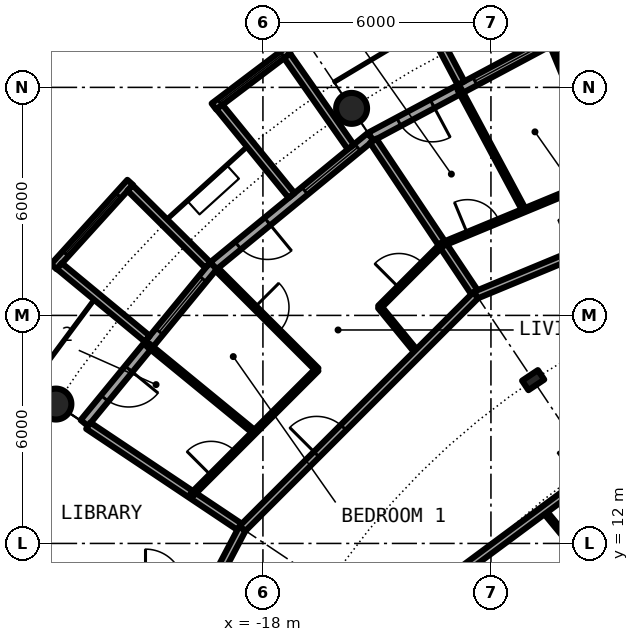
"""IFC4 building model, lengths in metres.
Left out: names, types, materials, properties, quantities, classifications, styles, units other than length and angle.
Written with IfcOpenShell. Run it as: python <this file> out.ifc"""

import sys

from ifc_helpers import new_model, si_unit, direction, frame, frame_2d, origin, origin_2d, place, context, subcontext, project, spatial, rectangle, circle, hollow_circle, i_section, extrude, element, fill, save


model = new_model("IFC4")
c1 = context("Model", 3, precision=1e-05, world=origin(), true_north=direction((0.0, 1.0)))
c2 = subcontext(c1, "Body", "Model", "MODEL_VIEW")
j1 = project(units=[si_unit("LENGTHUNIT", "METRE"), si_unit("PLANEANGLEUNIT", "RADIAN")], contexts=[c1])
p1 = place(None, origin())
s1 = spatial("IfcSite", under=j1, at=p1, CompositionType="ELEMENT")
p2 = place(p1, origin())
s2 = spatial("IfcBuilding", under=s1, at=p2, CompositionType="ELEMENT")
p3 = place(p2, frame((0.0, 0.0, 167.7)))
s3 = spatial("IfcBuildingStorey", under=s2, at=p3, CompositionType="ELEMENT", Elevation=167.7)
for number, where, z_axis, x_axis in (
    (1, (-15.667, 23.448, 0.0), (0.0, 0.0, 1.0), (1.0, 0.0, 0.0)),
    (2, (-23.448, 15.667, 0.0), (0.0, 0.0, 1.0), (1.0, 0.0, 0.0)),
):
    element("IfcColumn", number, at=place(p3, frame(where, z_axis=z_axis, x_axis=x_axis)), inside=s3, PredefinedType="COLUMN", context=c2, shape_type="SweptSolid", body=[
        extrude(hollow_circle(Radius=0.406, WallThickness=0.04, at=origin_2d()), origin(), (0.0, 0.0, 1.0), 3.05),
    ])
p4 = place(p3, frame((-10.889, 16.297, 0.0), z_axis=(0.0, 0.0, 1.0), x_axis=(-0.55557023302, 0.831469612303, 0.0)))
e3 = element("IfcColumn", 3, at=p4, inside=s3, PredefinedType="COLUMN", context=c2, shape_type="SweptSolid", body=[
    extrude(i_section(OverallWidth=0.3, OverallDepth=0.5, WebThickness=0.014, FlangeThickness=0.028, FilletRadius=0.027, at=origin_2d()), origin(), (0.0, 0.0, 1.0), 3.05),
])
p5 = place(p3, frame((-10.447, 25.222, 0.0), z_axis=(0.0, 0.0, 1.0), x_axis=(-0.881915646801, -0.471407246368, 0.0)))
e4 = element("IfcWall", 4, at=p5, inside=s3, PredefinedType="SOLIDWALL", context=c2, shape_type="SweptSolid", body=[
    extrude(rectangle(XDim=5.352, YDim=0.25, at=frame_2d((2.676, 0.0))), origin(), (0.0, 0.0, 1.0), 2.7),
])
p6 = place(p5, frame((0.441, 0.0, 0.3)))
e5 = element("IfcOpeningElement", 5, at=p6, cuts=e4, PredefinedType="OPENING", context=c2, shape_type="SweptSolid", body=[
    extrude(rectangle(XDim=1.8, YDim=2.1, at=frame_2d((0.9, 1.05))), frame((0.0, 0.135, 0.0), z_axis=(0.0, -1.0, 0.0), x_axis=(1.0, 0.0, 0.0)), (0.0, 0.0, 1.0), 0.27),
])
p7 = place(p5, frame((3.51, 0.0, 0.0)))
e6 = element("IfcOpeningElement", 6, at=p7, cuts=e4, PredefinedType="OPENING", context=c2, shape_type="SweptSolid", body=[
    extrude(rectangle(XDim=1.0, YDim=2.2, at=frame_2d((0.5, 1.1))), frame((0.0, 0.135, 0.0), z_axis=(0.0, -1.0, 0.0), x_axis=(1.0, 0.0, 0.0)), (0.0, 0.0, 1.0), 0.27),
])
p8 = place(p3, frame((-12.787, 24.113, -0.03), z_axis=(0.0, 0.0, 1.0), x_axis=(-0.468365282436, 0.883534924159, 0.0)))
e7 = element("IfcWall", 7, at=p8, inside=s3, PredefinedType="SOLIDWALL", context=c2, shape_type="SweptSolid", body=[
    extrude(rectangle(XDim=3.006, YDim=0.2, at=frame_2d((1.503, 0.0))), origin(), (0.0, 0.0, 1.0), 2.73),
])
p9 = place(p3, frame((-15.167, 22.699, 0.0), z_axis=(0.0, 0.0, 1.0), x_axis=(-0.773019449054, -0.634382322723, 0.0)))
e8 = element("IfcWall", 8, at=p9, inside=s3, PredefinedType="SOLIDWALL", context=c2, shape_type="SweptSolid", body=[
    extrude(rectangle(XDim=5.352, YDim=0.25, at=frame_2d((2.676, 0.0))), origin(), (0.0, 0.0, 1.0), 2.7),
])
p10 = place(p9, frame((0.441, 0.0, 0.3)))
e9 = element("IfcOpeningElement", 9, at=p10, cuts=e8, PredefinedType="OPENING", context=c2, shape_type="SweptSolid", body=[
    extrude(rectangle(XDim=1.8, YDim=2.1, at=frame_2d((0.9, 1.05))), frame((0.0, 0.135, 0.0), z_axis=(0.0, -1.0, 0.0), x_axis=(1.0, 0.0, 0.0)), (0.0, 0.0, 1.0), 0.27),
])
p11 = place(p9, frame((3.51, 0.0, 0.0)))
e10 = element("IfcOpeningElement", 10, at=p11, cuts=e8, PredefinedType="OPENING", context=c2, shape_type="SweptSolid", body=[
    extrude(rectangle(XDim=1.0, YDim=2.2, at=frame_2d((0.5, 1.1))), frame((0.0, 0.135, 0.0), z_axis=(0.0, -1.0, 0.0), x_axis=(1.0, 0.0, 0.0)), (0.0, 0.0, 1.0), 0.27),
])
p12 = place(p3, frame((-17.337, 24.972, -0.03), z_axis=(0.0, 0.0, 1.0), x_axis=(-0.797887588059, -0.602806268067, 0.0)))
e11 = element("IfcWall", 11, at=p12, inside=s3, PredefinedType="SOLIDWALL", context=c2, shape_type="SweptSolid", body=[
    extrude(rectangle(XDim=2.447, YDim=0.2, at=frame_2d((1.223, 0.0))), origin(), (0.0, 0.0, 1.0), 2.73),
])
p13 = place(p12, frame((0.183, 0.0, 0.33)))
e12 = element("IfcOpeningElement", 12, at=p13, cuts=e11, PredefinedType="OPENING", context=c2, shape_type="SweptSolid", body=[
    extrude(circle(Radius=1.04, at=frame_2d((1.04, 1.04))), frame((0.0, 0.11, 0.0), z_axis=(0.0, -1.0, 0.0), x_axis=(1.0, 0.0, 0.0)), (0.0, 0.0, 1.0), 0.22),
])
p14 = place(p3, frame((-15.688, 22.433, -0.03), z_axis=(0.0, 0.0, 1.0), x_axis=(-0.573260687834, 0.819373043115, 0.0)))
e13 = element("IfcWall", 13, at=p14, inside=s3, PredefinedType="SOLIDWALL", context=c2, shape_type="SweptSolid", body=[
    extrude(rectangle(XDim=2.925, YDim=0.2, at=frame_2d((1.463, 0.0))), origin(), (0.0, 0.0, 1.0), 2.73),
])
p15 = place(p3, frame((-17.246, 21.155, -0.03), z_axis=(0.0, 0.0, 1.0), x_axis=(-0.631741648902, 0.775179004516, 0.0)))
e14 = element("IfcWall", 14, at=p15, inside=s3, PredefinedType="SOLIDWALL", context=c2, shape_type="SweptSolid", body=[
    extrude(rectangle(XDim=3.006, YDim=0.2, at=frame_2d((1.503, 0.0))), origin(), (0.0, 0.0, 1.0), 2.73),
])
p16 = place(p3, frame((-19.304, 19.304, 0.0), z_axis=(0.0, 0.0, 1.0), x_axis=(-0.634382322723, -0.773019449054, 0.0)))
e15 = element("IfcWall", 15, at=p16, inside=s3, PredefinedType="SOLIDWALL", context=c2, shape_type="SweptSolid", body=[
    extrude(rectangle(XDim=5.352, YDim=0.25, at=frame_2d((2.676, 0.0))), origin(), (0.0, 0.0, 1.0), 2.7),
])
p17 = place(p16, frame((0.441, 0.0, 0.3)))
e16 = element("IfcOpeningElement", 16, at=p17, cuts=e15, PredefinedType="OPENING", context=c2, shape_type="SweptSolid", body=[
    extrude(rectangle(XDim=1.8, YDim=2.1, at=frame_2d((0.9, 1.05))), frame((0.0, 0.135, 0.0), z_axis=(0.0, -1.0, 0.0), x_axis=(1.0, 0.0, 0.0)), (0.0, 0.0, 1.0), 0.27),
])
p18 = place(p16, frame((3.51, 0.0, 0.0)))
e17 = element("IfcOpeningElement", 17, at=p18, cuts=e15, PredefinedType="OPENING", context=c2, shape_type="SweptSolid", body=[
    extrude(rectangle(XDim=1.0, YDim=2.2, at=frame_2d((0.5, 1.1))), frame((0.0, 0.135, 0.0), z_axis=(0.0, -1.0, 0.0), x_axis=(1.0, 0.0, 0.0)), (0.0, 0.0, 1.0), 0.27),
])
p19 = place(p3, frame((-21.493, 21.5, -0.03), z_axis=(0.0, 0.0, 1.0), x_axis=(-0.671506829416, -0.740998365753, 0.0)))
e18 = element("IfcWall", 18, at=p19, inside=s3, PredefinedType="SOLIDWALL", context=c2, shape_type="SweptSolid", body=[
    extrude(rectangle(XDim=2.993, YDim=0.2, at=frame_2d((1.497, 0.0))), origin(), (0.0, 0.0, 1.0), 2.73),
])
p20 = place(p19, frame((0.457, 0.0, 0.33)))
e19 = element("IfcOpeningElement", 19, at=p20, cuts=e18, PredefinedType="OPENING", context=c2, shape_type="SweptSolid", body=[
    extrude(circle(Radius=1.04, at=frame_2d((1.04, 1.04))), frame((0.0, 0.11, 0.0), z_axis=(0.0, -1.0, 0.0), x_axis=(1.0, 0.0, 0.0)), (0.0, 0.0, 1.0), 0.22),
])
p21 = place(p3, frame((-19.45, 19.323, -0.03), z_axis=(0.0, 0.0, 1.0), x_axis=(-0.709727076896, 0.704476739375, 0.0)))
e20 = element("IfcWall", 20, at=p21, inside=s3, PredefinedType="SOLIDWALL", context=c2, shape_type="SweptSolid", body=[
    extrude(rectangle(XDim=2.883, YDim=0.2, at=frame_2d((1.441, 0.0))), origin(), (0.0, 0.0, 1.0), 2.73),
])
p22 = place(p3, frame((-21.041, 17.384, -0.03), z_axis=(0.0, 0.0, 1.0), x_axis=(-0.770784861449, 0.63709551667, 0.0)))
e21 = element("IfcWall", 21, at=p22, inside=s3, PredefinedType="SOLIDWALL", context=c2, shape_type="SweptSolid", body=[
    extrude(rectangle(XDim=3.006, YDim=0.2, at=frame_2d((1.503, 0.0))), origin(), (0.0, 0.0, 1.0), 2.73),
])
p23 = place(p3, frame((-22.595, 15.098, 0.0), z_axis=(0.0, 0.0, 1.0), x_axis=(0.831387096605, -0.55569370664, 0.0)))
e22 = element("IfcWall", 22, at=p23, inside=s3, PredefinedType="PARTITIONING", context=c2, shape_type="SweptSolid", body=[
    extrude(rectangle(XDim=4.875, YDim=0.2, at=frame_2d((2.438, 0.0))), origin(), (0.0, 0.0, 1.0), 2.7),
])
p24 = place(p3, frame((-21.023, 17.22, 0.0), z_axis=(0.0, 0.0, 1.0), x_axis=(0.773548271597, -0.633737383709, 0.0)))
e23 = element("IfcWall", 23, at=p24, inside=s3, PredefinedType="PARTITIONING", context=c2, shape_type="SweptSolid", body=[
    extrude(rectangle(XDim=3.618, YDim=0.1, at=frame_2d((1.809, 0.0))), origin(), (0.0, 0.0, 1.0), 2.7),
])
p25 = place(p3, frame((-19.216, 19.216, 0.0), z_axis=(0.0, 0.0, 1.0), x_axis=(0.707106781187, -0.707106781187, 0.0)))
e24 = element("IfcWall", 24, at=p25, inside=s3, PredefinedType="PARTITIONING", context=c2, shape_type="SweptSolid", body=[
    extrude(rectangle(XDim=3.735, YDim=0.1, at=frame_2d((1.868, 0.0))), origin(), (0.0, 0.0, 1.0), 2.7),
])
p26 = place(p25, frame((1.417, 0.0, 0.0)))
e25 = element("IfcOpeningElement", 25, at=p26, cuts=e24, PredefinedType="OPENING", context=c2, shape_type="SweptSolid", body=[
    extrude(rectangle(XDim=0.9, YDim=2.3, at=frame_2d((0.45, 1.15))), frame((0.0, 0.06, 0.0), z_axis=(0.0, -1.0, 0.0), x_axis=(1.0, 0.0, 0.0)), (0.0, 0.0, 1.0), 0.12),
])
p27 = place(p3, frame((-15.098, 22.595, 0.0), z_axis=(0.0, 0.0, 1.0), x_axis=(0.55569370664, -0.831387096605, 0.0)))
e26 = element("IfcWall", 26, at=p27, inside=s3, PredefinedType="PARTITIONING", context=c2, shape_type="SweptSolid", body=[
    extrude(rectangle(XDim=4.875, YDim=0.2, at=frame_2d((2.438, 0.0))), origin(), (0.0, 0.0, 1.0), 2.7),
])
p28 = place(p3, frame((-14.93, 18.222, 0.0), z_axis=(0.0, 0.0, 1.0), x_axis=(0.633633636523, -0.773633255921, 0.0)))
e27 = element("IfcWall", 27, at=p28, inside=s3, PredefinedType="PARTITIONING", context=c2, shape_type="SweptSolid", body=[
    extrude(rectangle(XDim=1.578, YDim=0.1, at=frame_2d((0.789, 0.0))), origin(), (0.0, 0.0, 1.0), 2.7),
])
p29 = place(p3, frame((-12.833, 23.954, 0.0), z_axis=(0.0, 0.0, 1.0), x_axis=(0.472212052488, -0.881484984265, 0.0)))
e28 = element("IfcWall", 28, at=p29, inside=s3, PredefinedType="PARTITIONING", context=c2, shape_type="SweptSolid", body=[
    extrude(rectangle(XDim=3.619, YDim=0.1, at=frame_2d((1.81, 0.0))), origin(), (0.0, 0.0, 1.0), 2.7),
])
p30 = place(p3, frame((-10.616, 12.875, 0.0), z_axis=(0.0, 0.0, 1.0), x_axis=(0.636045954217, -0.771651180342, 0.0)))
e29 = element("IfcWall", 29, at=p30, inside=s3, PredefinedType="PARTITIONING", context=c2, shape_type="SweptSolid", body=[
    extrude(rectangle(XDim=8.968, YDim=0.1, at=frame_2d((4.484, 0.0))), origin(), (0.0, 0.0, 1.0), 2.7),
])
p31 = place(p30, frame((1.667, 0.0, 0.0)))
e30 = element("IfcOpeningElement", 30, at=p31, cuts=e29, PredefinedType="OPENING", context=c2, shape_type="SweptSolid", body=[
    extrude(rectangle(XDim=0.9, YDim=2.3, at=frame_2d((0.45, 1.15))), frame((0.0, 0.06, 0.0), z_axis=(0.0, -1.0, 0.0), x_axis=(1.0, 0.0, 0.0)), (0.0, 0.0, 1.0), 0.12),
])
p32 = place(p30, frame((6.151, 0.0, 0.0)))
e31 = element("IfcOpeningElement", 31, at=p32, cuts=e29, PredefinedType="OPENING", context=c2, shape_type="SweptSolid", body=[
    extrude(rectangle(XDim=0.9, YDim=2.3, at=frame_2d((0.45, 1.15))), frame((0.0, 0.06, 0.0), z_axis=(0.0, -1.0, 0.0), x_axis=(1.0, 0.0, 0.0)), (0.0, 0.0, 1.0), 0.12),
])
p33 = place(p3, frame((-10.399, 25.106, 0.0), z_axis=(0.0, 0.0, 1.0), x_axis=(0.382669377748, -0.923885353999, 0.0)))
e32 = element("IfcWall", 32, at=p33, inside=s3, PredefinedType="PARTITIONING", context=c2, shape_type="SweptSolid", body=[
    extrude(rectangle(XDim=3.734, YDim=0.1, at=frame_2d((1.867, 0.0))), origin(), (0.0, 0.0, 1.0), 2.7),
])
p34 = place(p33, frame((1.417, 0.0, 0.0)))
e33 = element("IfcOpeningElement", 33, at=p34, cuts=e32, PredefinedType="OPENING", context=c2, shape_type="SweptSolid", body=[
    extrude(rectangle(XDim=0.9, YDim=2.3, at=frame_2d((0.45, 1.15))), frame((0.0, 0.06, 0.0), z_axis=(0.0, -1.0, 0.0), x_axis=(1.0, 0.0, 0.0)), (0.0, 0.0, 1.0), 0.12),
])
p35 = place(p3, frame((-13.349, 10.848, 0.0), z_axis=(0.0, 0.0, 1.0), x_axis=(0.803229232922, 0.595670042371, 0.0)))
e34 = element("IfcWall", 34, at=p35, inside=s3, PredefinedType="PARTITIONING", context=c2, shape_type="SweptSolid", body=[
    extrude(rectangle(XDim=10.224, YDim=0.2, at=frame_2d((5.112, 0.0))), origin(), (0.0, 0.0, 1.0), 2.7),
])
p36 = place(p35, frame((4.612, 0.0, 0.0)))
e35 = element("IfcOpeningElement", 35, at=p36, cuts=e34, PredefinedType="OPENING", context=c2, shape_type="SweptSolid", body=[
    extrude(rectangle(XDim=1.0, YDim=2.3, at=frame_2d((0.5, 1.15))), frame((0.0, 0.11, 0.0), z_axis=(0.0, -1.0, 0.0), x_axis=(1.0, 0.0, 0.0)), (0.0, 0.0, 1.0), 0.22),
])
p37 = place(p3, frame((-18.542, 12.389, 0.0), z_axis=(0.0, 0.0, 1.0), x_axis=(0.707106781187, 0.707106781187, 0.0)))
e36 = element("IfcWall", 36, at=p37, inside=s3, PredefinedType="PARTITIONING", context=c2, shape_type="SweptSolid", body=[
    extrude(rectangle(XDim=8.702, YDim=0.2, at=frame_2d((4.351, 0.0))), origin(), (0.0, 0.0, 1.0), 2.7),
])
p38 = place(p37, frame((2.763, 0.0, 0.0)))
e37 = element("IfcOpeningElement", 37, at=p38, cuts=e36, PredefinedType="OPENING", context=c2, shape_type="SweptSolid", body=[
    extrude(rectangle(XDim=1.0, YDim=2.3, at=frame_2d((0.5, 1.15))), frame((0.0, 0.11, 0.0), z_axis=(0.0, -1.0, 0.0), x_axis=(1.0, 0.0, 0.0)), (0.0, 0.0, 1.0), 0.22),
])
p39 = place(p3, frame((-12.396, 18.536, 0.0), z_axis=(0.0, 0.0, 1.0), x_axis=(0.923722518166, 0.383062278792, 0.0)))
e38 = element("IfcWall", 38, at=p39, inside=s3, PredefinedType="PARTITIONING", context=c2, shape_type="SweptSolid", body=[
    extrude(rectangle(XDim=8.709, YDim=0.2, at=frame_2d((4.354, 0.0))), origin(), (0.0, 0.0, 1.0), 2.7),
])
p40 = place(p39, frame((2.772, 0.0, 0.0)))
e39 = element("IfcOpeningElement", 39, at=p40, cuts=e38, PredefinedType="OPENING", context=c2, shape_type="SweptSolid", body=[
    extrude(rectangle(XDim=1.0, YDim=2.3, at=frame_2d((0.5, 1.15))), frame((0.0, 0.11, 0.0), z_axis=(0.0, -1.0, 0.0), x_axis=(1.0, 0.0, 0.0)), (0.0, 0.0, 1.0), 0.22),
])
p41 = place(p3, frame((-19.307, 10.935, 0.0), z_axis=(0.0, 0.0, 1.0), x_axis=(0.465605550524, 0.884992356646, 0.0)))
e40 = element("IfcWall", 40, at=p41, inside=s3, PredefinedType="PARTITIONING", context=c2, shape_type="SweptSolid", body=[
    extrude(rectangle(XDim=1.643, YDim=0.2, at=frame_2d((0.821, 0.0))), origin(), (0.0, 0.0, 1.0), 2.7),
])
p42 = place(p3, frame((-19.872, 13.278, 0.0), z_axis=(0.0, 0.0, 1.0), x_axis=(0.707132961115, 0.707080600289, 0.0)))
e41 = element("IfcWall", 41, at=p42, inside=s3, PredefinedType="PARTITIONING", context=c2, shape_type="SweptSolid", body=[
    extrude(rectangle(XDim=4.663, YDim=0.1, at=frame_2d((2.331, 0.0))), origin(), (0.0, 0.0, 1.0), 2.7),
])
p43 = place(p42, frame((0.719, 0.0, 0.0)))
e42 = element("IfcOpeningElement", 42, at=p43, cuts=e41, PredefinedType="OPENING", context=c2, shape_type="SweptSolid", body=[
    extrude(rectangle(XDim=0.9, YDim=2.3, at=frame_2d((0.45, 1.15))), frame((0.0, 0.06, 0.0), z_axis=(0.0, -1.0, 0.0), x_axis=(1.0, 0.0, 0.0)), (0.0, 0.0, 1.0), 0.12),
])
p44 = place(p3, frame((-14.932, 18.218, 0.0), z_axis=(0.0, 0.0, 1.0), x_axis=(0.707106781187, 0.707106781187, 0.0)))
e43 = element("IfcWall", 43, at=p44, inside=s3, PredefinedType="PARTITIONING", context=c2, shape_type="SweptSolid", body=[
    extrude(rectangle(XDim=2.332, YDim=0.1, at=frame_2d((1.166, 0.0))), origin(), (0.0, 0.0, 1.0), 2.7),
])
p45 = place(p44, frame((0.723, 0.0, 0.0)))
e44 = element("IfcOpeningElement", 44, at=p45, cuts=e43, PredefinedType="OPENING", context=c2, shape_type="SweptSolid", body=[
    extrude(rectangle(XDim=0.9, YDim=2.3, at=frame_2d((0.45, 1.15))), frame((0.0, 0.06, 0.0), z_axis=(0.0, -1.0, 0.0), x_axis=(1.0, 0.0, 0.0)), (0.0, 0.0, 1.0), 0.12),
])
p46 = place(p3, frame((-13.278, 19.872, 0.0), z_axis=(0.0, 0.0, 1.0), x_axis=(0.923920484476, 0.38258455061, 0.0)))
e45 = element("IfcWall", 45, at=p46, inside=s3, PredefinedType="PARTITIONING", context=c2, shape_type="SweptSolid", body=[
    extrude(rectangle(XDim=4.663, YDim=0.1, at=frame_2d((2.332, 0.0))), origin(), (0.0, 0.0, 1.0), 2.7),
])
p47 = place(p46, frame((0.716, 0.0, 0.0)))
e46 = element("IfcOpeningElement", 46, at=p47, cuts=e45, PredefinedType="OPENING", context=c2, shape_type="SweptSolid", body=[
    extrude(rectangle(XDim=0.9, YDim=2.3, at=frame_2d((0.45, 1.15))), frame((0.0, 0.06, 0.0), z_axis=(0.0, -1.0, 0.0), x_axis=(1.0, 0.0, 0.0)), (0.0, 0.0, 1.0), 0.12),
])
p48 = place(p6, origin())
e47 = element("IfcWindow", 47, at=p48, inside=s3, PartitioningType="SINGLE_PANEL", PredefinedType="WINDOW", context=c2, shape_type="SweptSolid", body=[
    extrude(rectangle(XDim=1.8, YDim=2.1, at=frame_2d((0.9, 1.05))), frame((0.0, 0.03, 0.0), z_axis=(0.0, -1.0, 0.0), x_axis=(1.0, 0.0, 0.0)), (0.0, 0.0, 1.0), 0.06),
])
fill(e5, e47)
p49 = place(p7, origin())
e48 = element("IfcDoor", 48, at=p49, inside=s3, OperationType="SINGLE_SWING_LEFT", PredefinedType="DOOR", context=c2, shape_type="SweptSolid", body=[
    extrude(rectangle(XDim=1.0, YDim=2.2, at=frame_2d((0.5, 1.1))), frame((0.0, 0.025, 0.0), z_axis=(0.0, -1.0, 0.0), x_axis=(1.0, 0.0, 0.0)), (0.0, 0.0, 1.0), 0.05),
])
fill(e6, e48)
p50 = place(p10, origin())
e49 = element("IfcWindow", 49, at=p50, inside=s3, PartitioningType="SINGLE_PANEL", PredefinedType="WINDOW", context=c2, shape_type="SweptSolid", body=[
    extrude(rectangle(XDim=1.8, YDim=2.1, at=frame_2d((0.9, 1.05))), frame((0.0, 0.03, 0.0), z_axis=(0.0, -1.0, 0.0), x_axis=(1.0, 0.0, 0.0)), (0.0, 0.0, 1.0), 0.06),
])
fill(e9, e49)
p51 = place(p13, origin())
e50 = element("IfcWindow", 50, at=p51, inside=s3, PartitioningType="SINGLE_PANEL", PredefinedType="WINDOW", context=c2, shape_type="SweptSolid", body=[
    extrude(circle(Radius=1.04, at=frame_2d((1.04, 1.04))), frame((0.0, 0.03, 0.0), z_axis=(0.0, -1.0, 0.0), x_axis=(1.0, 0.0, 0.0)), (0.0, 0.0, 1.0), 0.06),
])
fill(e12, e50)
p52 = place(p11, origin())
e51 = element("IfcDoor", 51, at=p52, inside=s3, OperationType="SINGLE_SWING_LEFT", PredefinedType="DOOR", context=c2, shape_type="SweptSolid", body=[
    extrude(rectangle(XDim=1.0, YDim=2.2, at=frame_2d((0.5, 1.1))), frame((0.0, 0.025, 0.0), z_axis=(0.0, -1.0, 0.0), x_axis=(1.0, 0.0, 0.0)), (0.0, 0.0, 1.0), 0.05),
])
fill(e10, e51)
p53 = place(p17, origin())
e52 = element("IfcWindow", 52, at=p53, inside=s3, PartitioningType="SINGLE_PANEL", PredefinedType="WINDOW", context=c2, shape_type="SweptSolid", body=[
    extrude(rectangle(XDim=1.8, YDim=2.1, at=frame_2d((0.9, 1.05))), frame((0.0, 0.03, 0.0), z_axis=(0.0, -1.0, 0.0), x_axis=(1.0, 0.0, 0.0)), (0.0, 0.0, 1.0), 0.06),
])
fill(e16, e52)
p54 = place(p20, origin())
e53 = element("IfcWindow", 53, at=p54, inside=s3, PartitioningType="SINGLE_PANEL", PredefinedType="WINDOW", context=c2, shape_type="SweptSolid", body=[
    extrude(circle(Radius=1.04, at=frame_2d((1.04, 1.04))), frame((0.0, 0.03, 0.0), z_axis=(0.0, -1.0, 0.0), x_axis=(1.0, 0.0, 0.0)), (0.0, 0.0, 1.0), 0.06),
])
fill(e19, e53)
p55 = place(p18, origin())
e54 = element("IfcDoor", 54, at=p55, inside=s3, OperationType="SINGLE_SWING_LEFT", PredefinedType="DOOR", context=c2, shape_type="SweptSolid", body=[
    extrude(rectangle(XDim=1.0, YDim=2.2, at=frame_2d((0.5, 1.1))), frame((0.0, 0.025, 0.0), z_axis=(0.0, -1.0, 0.0), x_axis=(1.0, 0.0, 0.0)), (0.0, 0.0, 1.0), 0.05),
])
fill(e17, e54)
p56 = place(p47, origin())
e55 = element("IfcDoor", 55, at=p56, inside=s3, OperationType="SINGLE_SWING_LEFT", PredefinedType="DOOR", context=c2, shape_type="SweptSolid", body=[
    extrude(rectangle(XDim=0.9, YDim=2.3, at=frame_2d((0.45, 1.15))), frame((0.0, 0.025, 0.0), z_axis=(0.0, -1.0, 0.0), x_axis=(1.0, 0.0, 0.0)), (0.0, 0.0, 1.0), 0.05),
])
fill(e46, e55)
p57 = place(p38, origin())
e56 = element("IfcDoor", 56, at=p57, inside=s3, OperationType="SINGLE_SWING_LEFT", PredefinedType="DOOR", context=c2, shape_type="SweptSolid", body=[
    extrude(rectangle(XDim=1.0, YDim=2.3, at=frame_2d((0.5, 1.15))), frame((0.0, 0.025, 0.0), z_axis=(0.0, -1.0, 0.0), x_axis=(1.0, 0.0, 0.0)), (0.0, 0.0, 1.0), 0.05),
])
fill(e37, e56)
p58 = place(p45, origin())
e57 = element("IfcDoor", 57, at=p58, inside=s3, OperationType="SINGLE_SWING_RIGHT", PredefinedType="DOOR", context=c2, shape_type="SweptSolid", body=[
    extrude(rectangle(XDim=0.9, YDim=2.3, at=frame_2d((0.45, 1.15))), frame((0.0, 0.025, 0.0), z_axis=(0.0, -1.0, 0.0), x_axis=(1.0, 0.0, 0.0)), (0.0, 0.0, 1.0), 0.05),
])
fill(e44, e57)
p59 = place(p26, origin())
e58 = element("IfcDoor", 58, at=p59, inside=s3, OperationType="SINGLE_SWING_LEFT", PredefinedType="DOOR", context=c2, shape_type="SweptSolid", body=[
    extrude(rectangle(XDim=0.9, YDim=2.3, at=frame_2d((0.45, 1.15))), frame((0.0, 0.025, 0.0), z_axis=(0.0, -1.0, 0.0), x_axis=(1.0, 0.0, 0.0)), (0.0, 0.0, 1.0), 0.05),
])
fill(e25, e58)
p60 = place(p43, origin())
e59 = element("IfcDoor", 59, at=p60, inside=s3, OperationType="SINGLE_SWING_LEFT", PredefinedType="DOOR", context=c2, shape_type="SweptSolid", body=[
    extrude(rectangle(XDim=0.9, YDim=2.3, at=frame_2d((0.45, 1.15))), frame((0.0, 0.025, 0.0), z_axis=(0.0, -1.0, 0.0), x_axis=(1.0, 0.0, 0.0)), (0.0, 0.0, 1.0), 0.05),
])
fill(e42, e59)
save(model, sys.argv[1])
